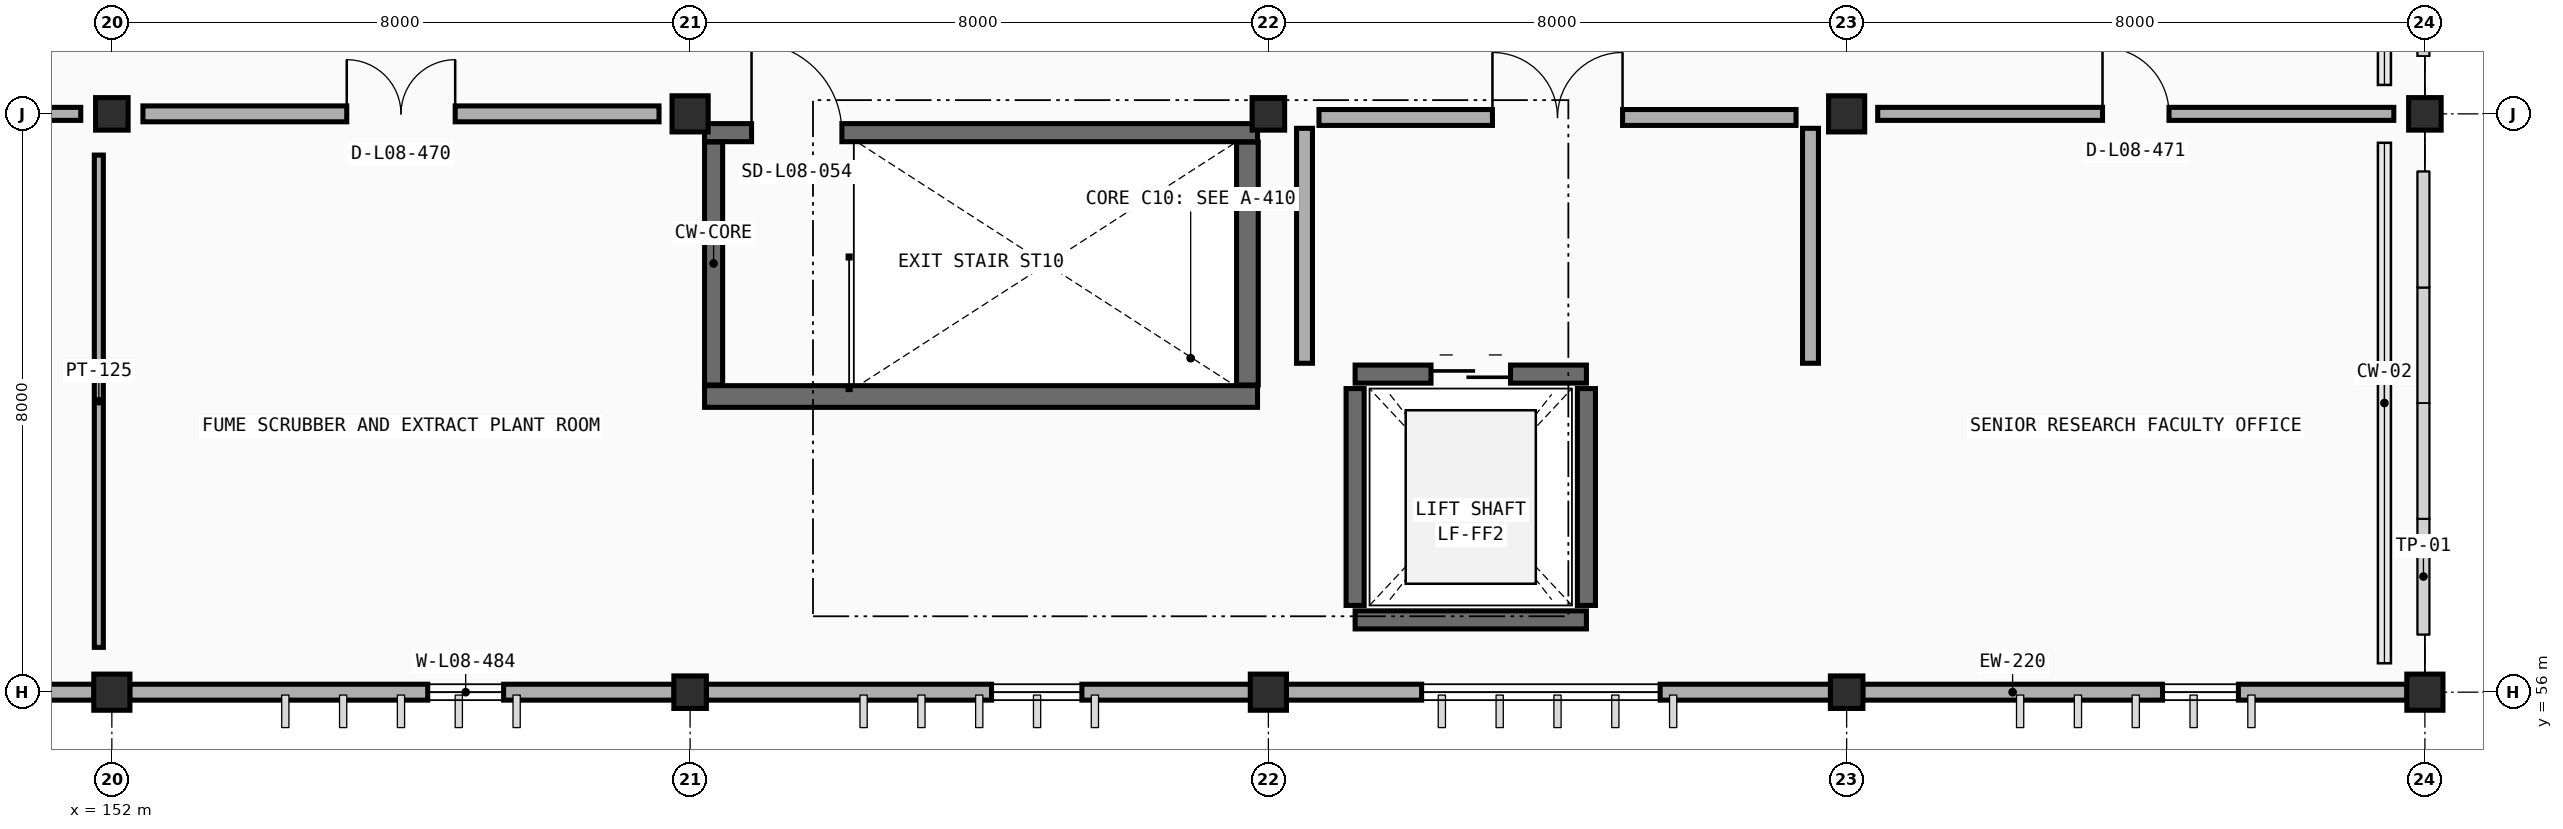
"""IFC4 building model, lengths in metres.
Left out: names, types, materials, properties, quantities, classifications, styles, units other than length and angle.
Written with IfcOpenShell. Run it as: python <this file> out.ifc"""

import sys

from ifc_helpers import new_model, si_unit, direction, frame, frame_2d, origin, origin_2d, place, context, subcontext, project, spatial, rectangle, extrude, element, fill, save


model = new_model("IFC4")
c1 = context("Model", 3, precision=1e-05, world=origin(), true_north=direction((0.0, 1.0)))
c2 = subcontext(c1, "Body", "Model", "MODEL_VIEW")
j1 = project(units=[si_unit("LENGTHUNIT", "METRE"), si_unit("PLANEANGLEUNIT", "RADIAN")], contexts=[c1])
p1 = place(None, origin())
s1 = spatial("IfcSite", under=j1, at=p1, CompositionType="ELEMENT")
p2 = place(p1, origin())
s2 = spatial("IfcBuilding", under=s1, at=p2, CompositionType="ELEMENT")
p3 = place(p2, frame((0.0, 0.0, 30.6)))
s3 = spatial("IfcBuildingStorey", under=s2, at=p3, CompositionType="ELEMENT", Elevation=30.6)
p4 = place(p3, frame((152.0, 56.0, 0.0), z_axis=(0.0, 0.0, 1.0), x_axis=(1.0, 0.0, 0.0)))
e1 = element("IfcColumn", 1, at=p4, inside=s3, PredefinedType="COLUMN", context=c2, shape_type="SweptSolid", body=[
    extrude(rectangle(XDim=0.5, YDim=0.5, at=origin_2d()), origin(), (0.0, 0.0, 1.0), 4.2),
])
p5 = place(p3, frame((160.0, 56.0, 0.0), z_axis=(0.0, 0.0, 1.0), x_axis=(1.0, 0.0, 0.0)))
e2 = element("IfcColumn", 2, at=p5, inside=s3, PredefinedType="COLUMN", context=c2, shape_type="SweptSolid", body=[
    extrude(rectangle(XDim=0.45, YDim=0.45, at=origin_2d()), origin(), (0.0, 0.0, 1.0), 4.2),
])
p6 = place(p3, frame((168.0, 56.0, 0.0), z_axis=(0.0, 0.0, 1.0), x_axis=(1.0, 0.0, 0.0)))
e3 = element("IfcColumn", 3, at=p6, inside=s3, PredefinedType="COLUMN", context=c2, shape_type="SweptSolid", body=[
    extrude(rectangle(XDim=0.5, YDim=0.5, at=origin_2d()), origin(), (0.0, 0.0, 1.0), 4.2),
])
p7 = place(p3, frame((176.0, 56.0, 0.0), z_axis=(0.0, 0.0, 1.0), x_axis=(1.0, 0.0, 0.0)))
e4 = element("IfcColumn", 4, at=p7, inside=s3, PredefinedType="COLUMN", context=c2, shape_type="SweptSolid", body=[
    extrude(rectangle(XDim=0.45, YDim=0.45, at=origin_2d()), origin(), (0.0, 0.0, 1.0), 4.2),
])
p8 = place(p3, frame((184.0, 56.0, 0.0), z_axis=(0.0, 0.0, 1.0), x_axis=(1.0, 0.0, 0.0)))
e5 = element("IfcColumn", 5, at=p8, inside=s3, PredefinedType="COLUMN", context=c2, shape_type="SweptSolid", body=[
    extrude(rectangle(XDim=0.5, YDim=0.5, at=origin_2d()), origin(), (0.0, 0.0, 1.0), 4.2),
])
p9 = place(p3, frame((152.0, 64.0, 0.0), z_axis=(0.0, 0.0, 1.0), x_axis=(1.0, 0.0, 0.0)))
e6 = element("IfcColumn", 6, at=p9, inside=s3, PredefinedType="COLUMN", context=c2, shape_type="SweptSolid", body=[
    extrude(rectangle(XDim=0.45, YDim=0.45, at=origin_2d()), origin(), (0.0, 0.0, 1.0), 4.2),
])
p10 = place(p3, frame((160.0, 64.0, 0.0), z_axis=(0.0, 0.0, 1.0), x_axis=(1.0, 0.0, 0.0)))
e7 = element("IfcColumn", 7, at=p10, inside=s3, PredefinedType="COLUMN", context=c2, shape_type="SweptSolid", body=[
    extrude(rectangle(XDim=0.5, YDim=0.5, at=origin_2d()), origin(), (0.0, 0.0, 1.0), 4.2),
])
p11 = place(p3, frame((168.0, 64.0, 0.0), z_axis=(0.0, 0.0, 1.0), x_axis=(1.0, 0.0, 0.0)))
e8 = element("IfcColumn", 8, at=p11, inside=s3, PredefinedType="COLUMN", context=c2, shape_type="SweptSolid", body=[
    extrude(rectangle(XDim=0.45, YDim=0.45, at=origin_2d()), origin(), (0.0, 0.0, 1.0), 4.2),
])
p12 = place(p3, frame((176.0, 64.0, 0.0), z_axis=(0.0, 0.0, 1.0), x_axis=(1.0, 0.0, 0.0)))
e9 = element("IfcColumn", 9, at=p12, inside=s3, PredefinedType="COLUMN", context=c2, shape_type="SweptSolid", body=[
    extrude(rectangle(XDim=0.5, YDim=0.5, at=origin_2d()), origin(), (0.0, 0.0, 1.0), 4.2),
])
p13 = place(p3, frame((184.0, 64.0, 0.0), z_axis=(0.0, 0.0, 1.0), x_axis=(1.0, 0.0, 0.0)))
e10 = element("IfcColumn", 10, at=p13, inside=s3, PredefinedType="COLUMN", context=c2, shape_type="SweptSolid", body=[
    extrude(rectangle(XDim=0.45, YDim=0.45, at=origin_2d()), origin(), (0.0, 0.0, 1.0), 4.2),
])
p14 = place(p3, frame((151.753, 56.0, 0.0), z_axis=(0.0, 0.0, 1.0), x_axis=(-1.0, 0.0, 0.0)))
e11 = element("IfcWall", 11, at=p14, inside=s3, PredefinedType="STANDARD", context=c2, shape_type="SweptSolid", body=[
    extrude(rectangle(XDim=7.531, YDim=0.22, at=frame_2d((3.766, 0.0))), origin(), (0.0, 0.0, 1.0), 3.335),
])
p15 = place(p14, frame((2.333, 0.0, 0.9)))
e12 = element("IfcOpeningElement", 12, at=p15, cuts=e11, PredefinedType="OPENING", context=c2, shape_type="SweptSolid", body=[
    extrude(rectangle(XDim=3.3, YDim=1.75, at=frame_2d((1.65, 0.875))), frame((0.0, 0.12, 0.0), z_axis=(0.0, -1.0, 0.0), x_axis=(1.0, 0.0, 0.0)), (0.0, 0.0, 1.0), 0.24),
])
p16 = place(p3, frame((159.778, 56.0, 0.0), z_axis=(0.0, 0.0, 1.0), x_axis=(-1.0, 0.0, 0.0)))
e13 = element("IfcWall", 13, at=p16, inside=s3, PredefinedType="STANDARD", context=c2, shape_type="SweptSolid", body=[
    extrude(rectangle(XDim=7.531, YDim=0.22, at=frame_2d((3.766, 0.0))), origin(), (0.0, 0.0, 1.0), 3.335),
])
p17 = place(p16, frame((2.358, 0.0, 0.9)))
e14 = element("IfcOpeningElement", 14, at=p17, cuts=e13, PredefinedType="OPENING", context=c2, shape_type="SweptSolid", body=[
    extrude(rectangle(XDim=1.05, YDim=1.25, at=frame_2d((0.525, 0.625))), frame((0.0, 0.12, 0.0), z_axis=(0.0, -1.0, 0.0), x_axis=(1.0, 0.0, 0.0)), (0.0, 0.0, 1.0), 0.24),
])
p18 = place(p3, frame((167.753, 56.0, 0.0), z_axis=(0.0, 0.0, 1.0), x_axis=(-1.0, 0.0, 0.0)))
e15 = element("IfcWall", 15, at=p18, inside=s3, PredefinedType="STANDARD", context=c2, shape_type="SweptSolid", body=[
    extrude(rectangle(XDim=7.531, YDim=0.22, at=frame_2d((3.766, 0.0))), origin(), (0.0, 0.0, 1.0), 3.335),
])
p19 = place(p18, frame((2.333, 0.0, 0.9)))
e16 = element("IfcOpeningElement", 16, at=p19, cuts=e15, PredefinedType="OPENING", context=c2, shape_type="SweptSolid", body=[
    extrude(rectangle(XDim=1.25, YDim=1.25, at=frame_2d((0.625, 0.625))), frame((0.0, 0.12, 0.0), z_axis=(0.0, -1.0, 0.0), x_axis=(1.0, 0.0, 0.0)), (0.0, 0.0, 1.0), 0.24),
])
p20 = place(p3, frame((175.778, 56.0, 0.0), z_axis=(0.0, 0.0, 1.0), x_axis=(-1.0, 0.0, 0.0)))
e17 = element("IfcWall", 17, at=p20, inside=s3, PredefinedType="STANDARD", context=c2, shape_type="SweptSolid", body=[
    extrude(rectangle(XDim=7.531, YDim=0.22, at=frame_2d((3.766, 0.0))), origin(), (0.0, 0.0, 1.0), 3.335),
])
p21 = place(p20, frame((2.358, 0.0, 0.9)))
e18 = element("IfcOpeningElement", 18, at=p21, cuts=e17, PredefinedType="OPENING", context=c2, shape_type="SweptSolid", body=[
    extrude(rectangle(XDim=3.3, YDim=1.75, at=frame_2d((1.65, 0.875))), frame((0.0, 0.12, 0.0), z_axis=(0.0, -1.0, 0.0), x_axis=(1.0, 0.0, 0.0)), (0.0, 0.0, 1.0), 0.24),
])
p22 = place(p3, frame((183.753, 56.0, 0.0), z_axis=(0.0, 0.0, 1.0), x_axis=(-1.0, 0.0, 0.0)))
e19 = element("IfcWall", 19, at=p22, inside=s3, PredefinedType="STANDARD", context=c2, shape_type="SweptSolid", body=[
    extrude(rectangle(XDim=7.531, YDim=0.22, at=frame_2d((3.766, 0.0))), origin(), (0.0, 0.0, 1.0), 3.335),
])
p23 = place(p22, frame((2.333, 0.0, 0.9)))
e20 = element("IfcOpeningElement", 20, at=p23, cuts=e19, PredefinedType="OPENING", context=c2, shape_type="SweptSolid", body=[
    extrude(rectangle(XDim=1.05, YDim=1.25, at=frame_2d((0.525, 0.625))), frame((0.0, 0.12, 0.0), z_axis=(0.0, -1.0, 0.0), x_axis=(1.0, 0.0, 0.0)), (0.0, 0.0, 1.0), 0.24),
])
for number, where, z_axis, x_axis in (
    (21, (183.76, 56.22, 0.0), (0.0, 0.0, 1.0), (-1.0, 0.0, 0.0)),
    (22, (183.76, 63.78, 0.0), (0.0, 0.0, 1.0), (-1.0, 0.0, 0.0)),
    (23, (183.76, 64.22, 0.0), (0.0, 0.0, 1.0), (-1.0, 0.0, 0.0)),
):
    element("IfcWall", number, at=place(p3, frame(where, z_axis=z_axis, x_axis=x_axis)), inside=s3, PredefinedType="PARAPET", context=c2, shape_type="SweptSolid", body=[
        extrude(rectangle(XDim=0.32, YDim=0.2, at=frame_2d((0.16, 0.0))), origin(), (0.0, 0.0, 1.0), 3.35),
    ])
p24 = place(p3, frame((151.9, 48.22, 0.0), z_axis=(0.0, 0.0, 1.0), x_axis=(0.0, 1.0, 0.0)))
e24 = element("IfcWall", 24, at=p24, inside=s3, PredefinedType="PARAPET", context=c2, shape_type="SweptSolid", body=[
    extrude(rectangle(XDim=7.56, YDim=0.18, at=frame_2d((3.78, 0.0))), origin(), (0.0, 0.0, 1.0), 1.15),
])
p25 = place(p3, frame((160.2, 60.09, 0.0), z_axis=(0.0, 0.0, 1.0), x_axis=(1.0, 0.0, 0.0)))
e25 = element("IfcWall", 25, at=p25, inside=s3, PredefinedType="SHEAR", context=c2, shape_type="SweptSolid", body=[
    extrude(rectangle(XDim=7.65, YDim=0.3, at=frame_2d((3.825, 0.0))), origin(), (0.0, 0.0, 1.0), 4.2),
])
p26 = place(p3, frame((167.71, 60.25, 0.0), z_axis=(0.0, 0.0, 1.0), x_axis=(0.0, 1.0, 0.0)))
e26 = element("IfcWall", 26, at=p26, inside=s3, PredefinedType="SHEAR", context=c2, shape_type="SweptSolid", body=[
    extrude(rectangle(XDim=3.36, YDim=0.3, at=frame_2d((1.68, 0.0))), origin(), (0.0, 0.0, 1.0), 4.2),
])
p27 = place(p3, frame((160.2, 63.74, 0.0), z_axis=(0.0, 0.0, 1.0), x_axis=(1.0, 0.0, 0.0)))
e27 = element("IfcWall", 27, at=p27, inside=s3, PredefinedType="SOLIDWALL", context=c2, shape_type="SweptSolid", body=[
    extrude(rectangle(XDim=7.65, YDim=0.25, at=frame_2d((3.825, 0.0))), origin(), (0.0, 0.0, 1.0), 4.2),
])
p28 = place(p27, frame((0.65, 0.0, 0.0)))
e28 = element("IfcOpeningElement", 28, at=p28, cuts=e27, PredefinedType="OPENING", context=c2, shape_type="SweptSolid", body=[
    extrude(rectangle(XDim=1.25, YDim=2.15, at=frame_2d((0.625, 1.075))), frame((0.0, 0.135, 0.0), z_axis=(0.0, -1.0, 0.0), x_axis=(1.0, 0.0, 0.0)), (0.0, 0.0, 1.0), 0.27),
])
p29 = place(p3, frame((160.325, 60.25, 0.0), z_axis=(0.0, 0.0, 1.0), x_axis=(0.0, 1.0, 0.0)))
e29 = element("IfcWall", 29, at=p29, inside=s3, PredefinedType="SOLIDWALL", context=c2, shape_type="SweptSolid", body=[
    extrude(rectangle(XDim=3.36, YDim=0.25, at=frame_2d((1.68, 0.0))), origin(), (0.0, 0.0, 1.0), 4.2),
])
p30 = place(p3, frame((169.2, 57.0, 0.0), z_axis=(0.0, 0.0, 1.0), x_axis=(1.0, 0.0, 0.0)))
e30 = element("IfcWall", 30, at=p30, inside=s3, PredefinedType="SOLIDWALL", context=c2, shape_type="SweptSolid", body=[
    extrude(rectangle(XDim=3.2, YDim=0.25, at=frame_2d((1.6, 0.0))), origin(), (0.0, 0.0, 1.0), 4.2),
])
p31 = place(p3, frame((169.2, 60.4, 0.0), z_axis=(0.0, 0.0, 1.0), x_axis=(1.0, 0.0, 0.0)))
e31 = element("IfcWall", 31, at=p31, inside=s3, PredefinedType="SOLIDWALL", context=c2, shape_type="SweptSolid", body=[
    extrude(rectangle(XDim=3.2, YDim=0.25, at=frame_2d((1.6, 0.0))), origin(), (0.0, 0.0, 1.0), 4.2),
])
p32 = place(p31, frame((1.05, 0.0, 0.0)))
e32 = element("IfcOpeningElement", 32, at=p32, cuts=e31, PredefinedType="OPENING", context=c2, shape_type="SweptSolid", body=[
    extrude(rectangle(XDim=1.1, YDim=2.15, at=frame_2d((0.55, 1.075))), frame((0.0, 0.135, 0.0), z_axis=(0.0, -1.0, 0.0), x_axis=(1.0, 0.0, 0.0)), (0.0, 0.0, 1.0), 0.27),
])
for number, where, z_axis, x_axis in (
    (33, (169.2, 57.2, 0.0), (0.0, 0.0, 1.0), (0.0, 1.0, 0.0)),
    (34, (172.4, 57.2, 0.0), (0.0, 0.0, 1.0), (0.0, 1.0, 0.0)),
):
    element("IfcWall", number, at=place(p3, frame(where, z_axis=z_axis, x_axis=x_axis)), inside=s3, PredefinedType="SOLIDWALL", context=c2, shape_type="SweptSolid", body=[
        extrude(rectangle(XDim=3.0, YDim=0.25, at=frame_2d((1.5, 0.0))), origin(), (0.0, 0.0, 1.0), 4.2),
    ])
p33 = place(p3, frame((168.7, 63.95, 0.0), z_axis=(0.0, 0.0, 1.0), x_axis=(1.0, 0.0, 0.0)))
e35 = element("IfcWall", 35, at=p33, inside=s3, PredefinedType="PARTITIONING", context=c2, shape_type="SweptSolid", body=[
    extrude(rectangle(XDim=6.6, YDim=0.22, at=frame_2d((3.3, 0.0))), origin(), (0.0, 0.0, 1.0), 3.3),
])
p34 = place(p33, frame((2.4, 0.0, 0.0)))
e36 = element("IfcOpeningElement", 36, at=p34, cuts=e35, PredefinedType="OPENING", context=c2, shape_type="SweptSolid", body=[
    extrude(rectangle(XDim=1.8, YDim=2.2, at=frame_2d((0.9, 1.1))), frame((0.0, 0.12, 0.0), z_axis=(0.0, -1.0, 0.0), x_axis=(1.0, 0.0, 0.0)), (0.0, 0.0, 1.0), 0.24),
])
for number, where, z_axis, x_axis in (
    (37, (168.5, 60.55, 0.0), (0.0, 0.0, 1.0), (0.0, 1.0, 0.0)),
    (38, (175.5, 60.55, 0.0), (0.0, 0.0, 1.0), (0.0, 1.0, 0.0)),
):
    element("IfcWall", number, at=place(p3, frame(where, z_axis=z_axis, x_axis=x_axis)), inside=s3, PredefinedType="PARTITIONING", context=c2, shape_type="SweptSolid", body=[
        extrude(rectangle(XDim=3.25, YDim=0.22, at=frame_2d((1.625, 0.0))), origin(), (0.0, 0.0, 1.0), 3.3),
    ])
p35 = place(p3, frame((136.43, 64.0, 0.0), z_axis=(0.0, 0.0, 1.0), x_axis=(1.0, 0.0, 0.0)))
e39 = element("IfcWall", 39, at=p35, inside=s3, PredefinedType="PARTITIONING", context=c2, shape_type="SweptSolid", body=[
    extrude(rectangle(XDim=15.14, YDim=0.18, at=frame_2d((7.57, 0.0))), origin(), (0.0, 0.0, 1.0), 3.3),
])
p36 = place(p35, frame((2.96, 0.0, 0.0)))
e40 = element("IfcOpeningElement", 40, at=p36, cuts=e39, PredefinedType="OPENING", context=c2, shape_type="SweptSolid", body=[
    extrude(rectangle(XDim=1.22, YDim=2.18, at=frame_2d((0.61, 1.09))), frame((0.0, 0.1, 0.0), z_axis=(0.0, -1.0, 0.0), x_axis=(1.0, 0.0, 0.0)), (0.0, 0.0, 1.0), 0.2),
])
p37 = place(p3, frame((151.82, 56.62, 0.0), z_axis=(0.0, 0.0, 1.0), x_axis=(0.0, 1.0, 0.0)))
e41 = element("IfcWall", 41, at=p37, inside=s3, PredefinedType="PARTITIONING", context=c2, shape_type="SweptSolid", body=[
    extrude(rectangle(XDim=6.81, YDim=0.125, at=frame_2d((3.405, 0.0))), origin(), (0.0, 0.0, 1.0), 3.3),
])
p38 = place(p3, frame((152.43, 64.0, 0.0), z_axis=(0.0, 0.0, 1.0), x_axis=(1.0, 0.0, 0.0)))
e42 = element("IfcWall", 42, at=p38, inside=s3, PredefinedType="PARTITIONING", context=c2, shape_type="SweptSolid", body=[
    extrude(rectangle(XDim=7.14, YDim=0.22, at=frame_2d((3.57, 0.0))), origin(), (0.0, 0.0, 1.0), 3.3),
])
p39 = place(p38, frame((2.82, 0.0, 0.0)))
e43 = element("IfcOpeningElement", 43, at=p39, cuts=e42, PredefinedType="OPENING", context=c2, shape_type="SweptSolid", body=[
    extrude(rectangle(XDim=1.5, YDim=2.2, at=frame_2d((0.75, 1.1))), frame((0.0, 0.12, 0.0), z_axis=(0.0, -1.0, 0.0), x_axis=(1.0, 0.0, 0.0)), (0.0, 0.0, 1.0), 0.24),
])
p40 = place(p3, frame((176.43, 64.0, 0.0), z_axis=(0.0, 0.0, 1.0), x_axis=(1.0, 0.0, 0.0)))
e44 = element("IfcWall", 44, at=p40, inside=s3, PredefinedType="PARTITIONING", context=c2, shape_type="SweptSolid", body=[
    extrude(rectangle(XDim=7.14, YDim=0.18, at=frame_2d((3.57, 0.0))), origin(), (0.0, 0.0, 1.0), 3.3),
])
p41 = place(p40, frame((3.11, 0.0, 0.0)))
e45 = element("IfcOpeningElement", 45, at=p41, cuts=e44, PredefinedType="OPENING", context=c2, shape_type="SweptSolid", body=[
    extrude(rectangle(XDim=0.92, YDim=2.15, at=frame_2d((0.46, 1.075))), frame((0.0, 0.1, 0.0), z_axis=(0.0, -1.0, 0.0), x_axis=(1.0, 0.0, 0.0)), (0.0, 0.0, 1.0), 0.2),
])
p42 = place(p17, origin())
e46 = element("IfcWindow", 46, at=p42, inside=s3, PartitioningType="SINGLE_PANEL", PredefinedType="WINDOW", context=c2, shape_type="SweptSolid", body=[
    extrude(rectangle(XDim=1.05, YDim=1.25, at=frame_2d((0.525, 0.625))), frame((0.0, 0.03, 0.0), z_axis=(0.0, -1.0, 0.0), x_axis=(1.0, 0.0, 0.0)), (0.0, 0.0, 1.0), 0.06),
])
fill(e14, e46)
p43 = place(p19, origin())
e47 = element("IfcWindow", 47, at=p43, inside=s3, PartitioningType="SINGLE_PANEL", PredefinedType="WINDOW", context=c2, shape_type="SweptSolid", body=[
    extrude(rectangle(XDim=1.25, YDim=1.25, at=frame_2d((0.625, 0.625))), frame((0.0, 0.03, 0.0), z_axis=(0.0, -1.0, 0.0), x_axis=(1.0, 0.0, 0.0)), (0.0, 0.0, 1.0), 0.06),
])
fill(e16, e47)
p44 = place(p21, origin())
e48 = element("IfcWindow", 48, at=p44, inside=s3, PartitioningType="DOUBLE_PANEL_VERTICAL", PredefinedType="WINDOW", context=c2, shape_type="SweptSolid", body=[
    extrude(rectangle(XDim=3.3, YDim=1.75, at=frame_2d((1.65, 0.875))), frame((0.0, 0.03, 0.0), z_axis=(0.0, -1.0, 0.0), x_axis=(1.0, 0.0, 0.0)), (0.0, 0.0, 1.0), 0.06),
])
fill(e18, e48)
p45 = place(p23, origin())
e49 = element("IfcWindow", 49, at=p45, inside=s3, PartitioningType="SINGLE_PANEL", PredefinedType="WINDOW", context=c2, shape_type="SweptSolid", body=[
    extrude(rectangle(XDim=1.05, YDim=1.25, at=frame_2d((0.525, 0.625))), frame((0.0, 0.03, 0.0), z_axis=(0.0, -1.0, 0.0), x_axis=(1.0, 0.0, 0.0)), (0.0, 0.0, 1.0), 0.06),
])
fill(e20, e49)
p46 = place(p28, origin())
e50 = element("IfcDoor", 50, at=p46, inside=s3, OperationType="SINGLE_SWING_LEFT", PredefinedType="DOOR", context=c2, shape_type="SweptSolid", body=[
    extrude(rectangle(XDim=1.25, YDim=2.15, at=frame_2d((0.625, 1.075))), frame((0.0, 0.025, 0.0), z_axis=(0.0, -1.0, 0.0), x_axis=(1.0, 0.0, 0.0)), (0.0, 0.0, 1.0), 0.05),
])
fill(e28, e50)
p47 = place(p32, origin())
e51 = element("IfcDoor", 51, at=p47, inside=s3, OperationType="DOUBLE_DOOR_SLIDING", PredefinedType="DOOR", context=c2, shape_type="SweptSolid", body=[
    extrude(rectangle(XDim=1.1, YDim=2.15, at=frame_2d((0.55, 1.075))), frame((0.0, 0.025, 0.0), z_axis=(0.0, -1.0, 0.0), x_axis=(1.0, 0.0, 0.0)), (0.0, 0.0, 1.0), 0.05),
])
fill(e32, e51)
p48 = place(p34, origin())
e52 = element("IfcDoor", 52, at=p48, inside=s3, OperationType="DOUBLE_DOOR_SINGLE_SWING", PredefinedType="DOOR", context=c2, shape_type="SweptSolid", body=[
    extrude(rectangle(XDim=1.8, YDim=2.2, at=frame_2d((0.9, 1.1))), frame((0.0, 0.025, 0.0), z_axis=(0.0, -1.0, 0.0), x_axis=(1.0, 0.0, 0.0)), (0.0, 0.0, 1.0), 0.05),
])
fill(e36, e52)
p49 = place(p39, origin())
e53 = element("IfcDoor", 53, at=p49, inside=s3, OperationType="DOUBLE_DOOR_SINGLE_SWING", PredefinedType="DOOR", context=c2, shape_type="SweptSolid", body=[
    extrude(rectangle(XDim=1.5, YDim=2.2, at=frame_2d((0.75, 1.1))), frame((0.0, 0.025, 0.0), z_axis=(0.0, -1.0, 0.0), x_axis=(1.0, 0.0, 0.0)), (0.0, 0.0, 1.0), 0.05),
])
fill(e43, e53)
p50 = place(p41, origin())
e54 = element("IfcDoor", 54, at=p50, inside=s3, OperationType="SINGLE_SWING_LEFT", PredefinedType="DOOR", context=c2, shape_type="SweptSolid", body=[
    extrude(rectangle(XDim=0.92, YDim=2.15, at=frame_2d((0.46, 1.075))), frame((0.0, 0.025, 0.0), z_axis=(0.0, -1.0, 0.0), x_axis=(1.0, 0.0, 0.0)), (0.0, 0.0, 1.0), 0.05),
])
fill(e45, e54)
save(model, sys.argv[1])
